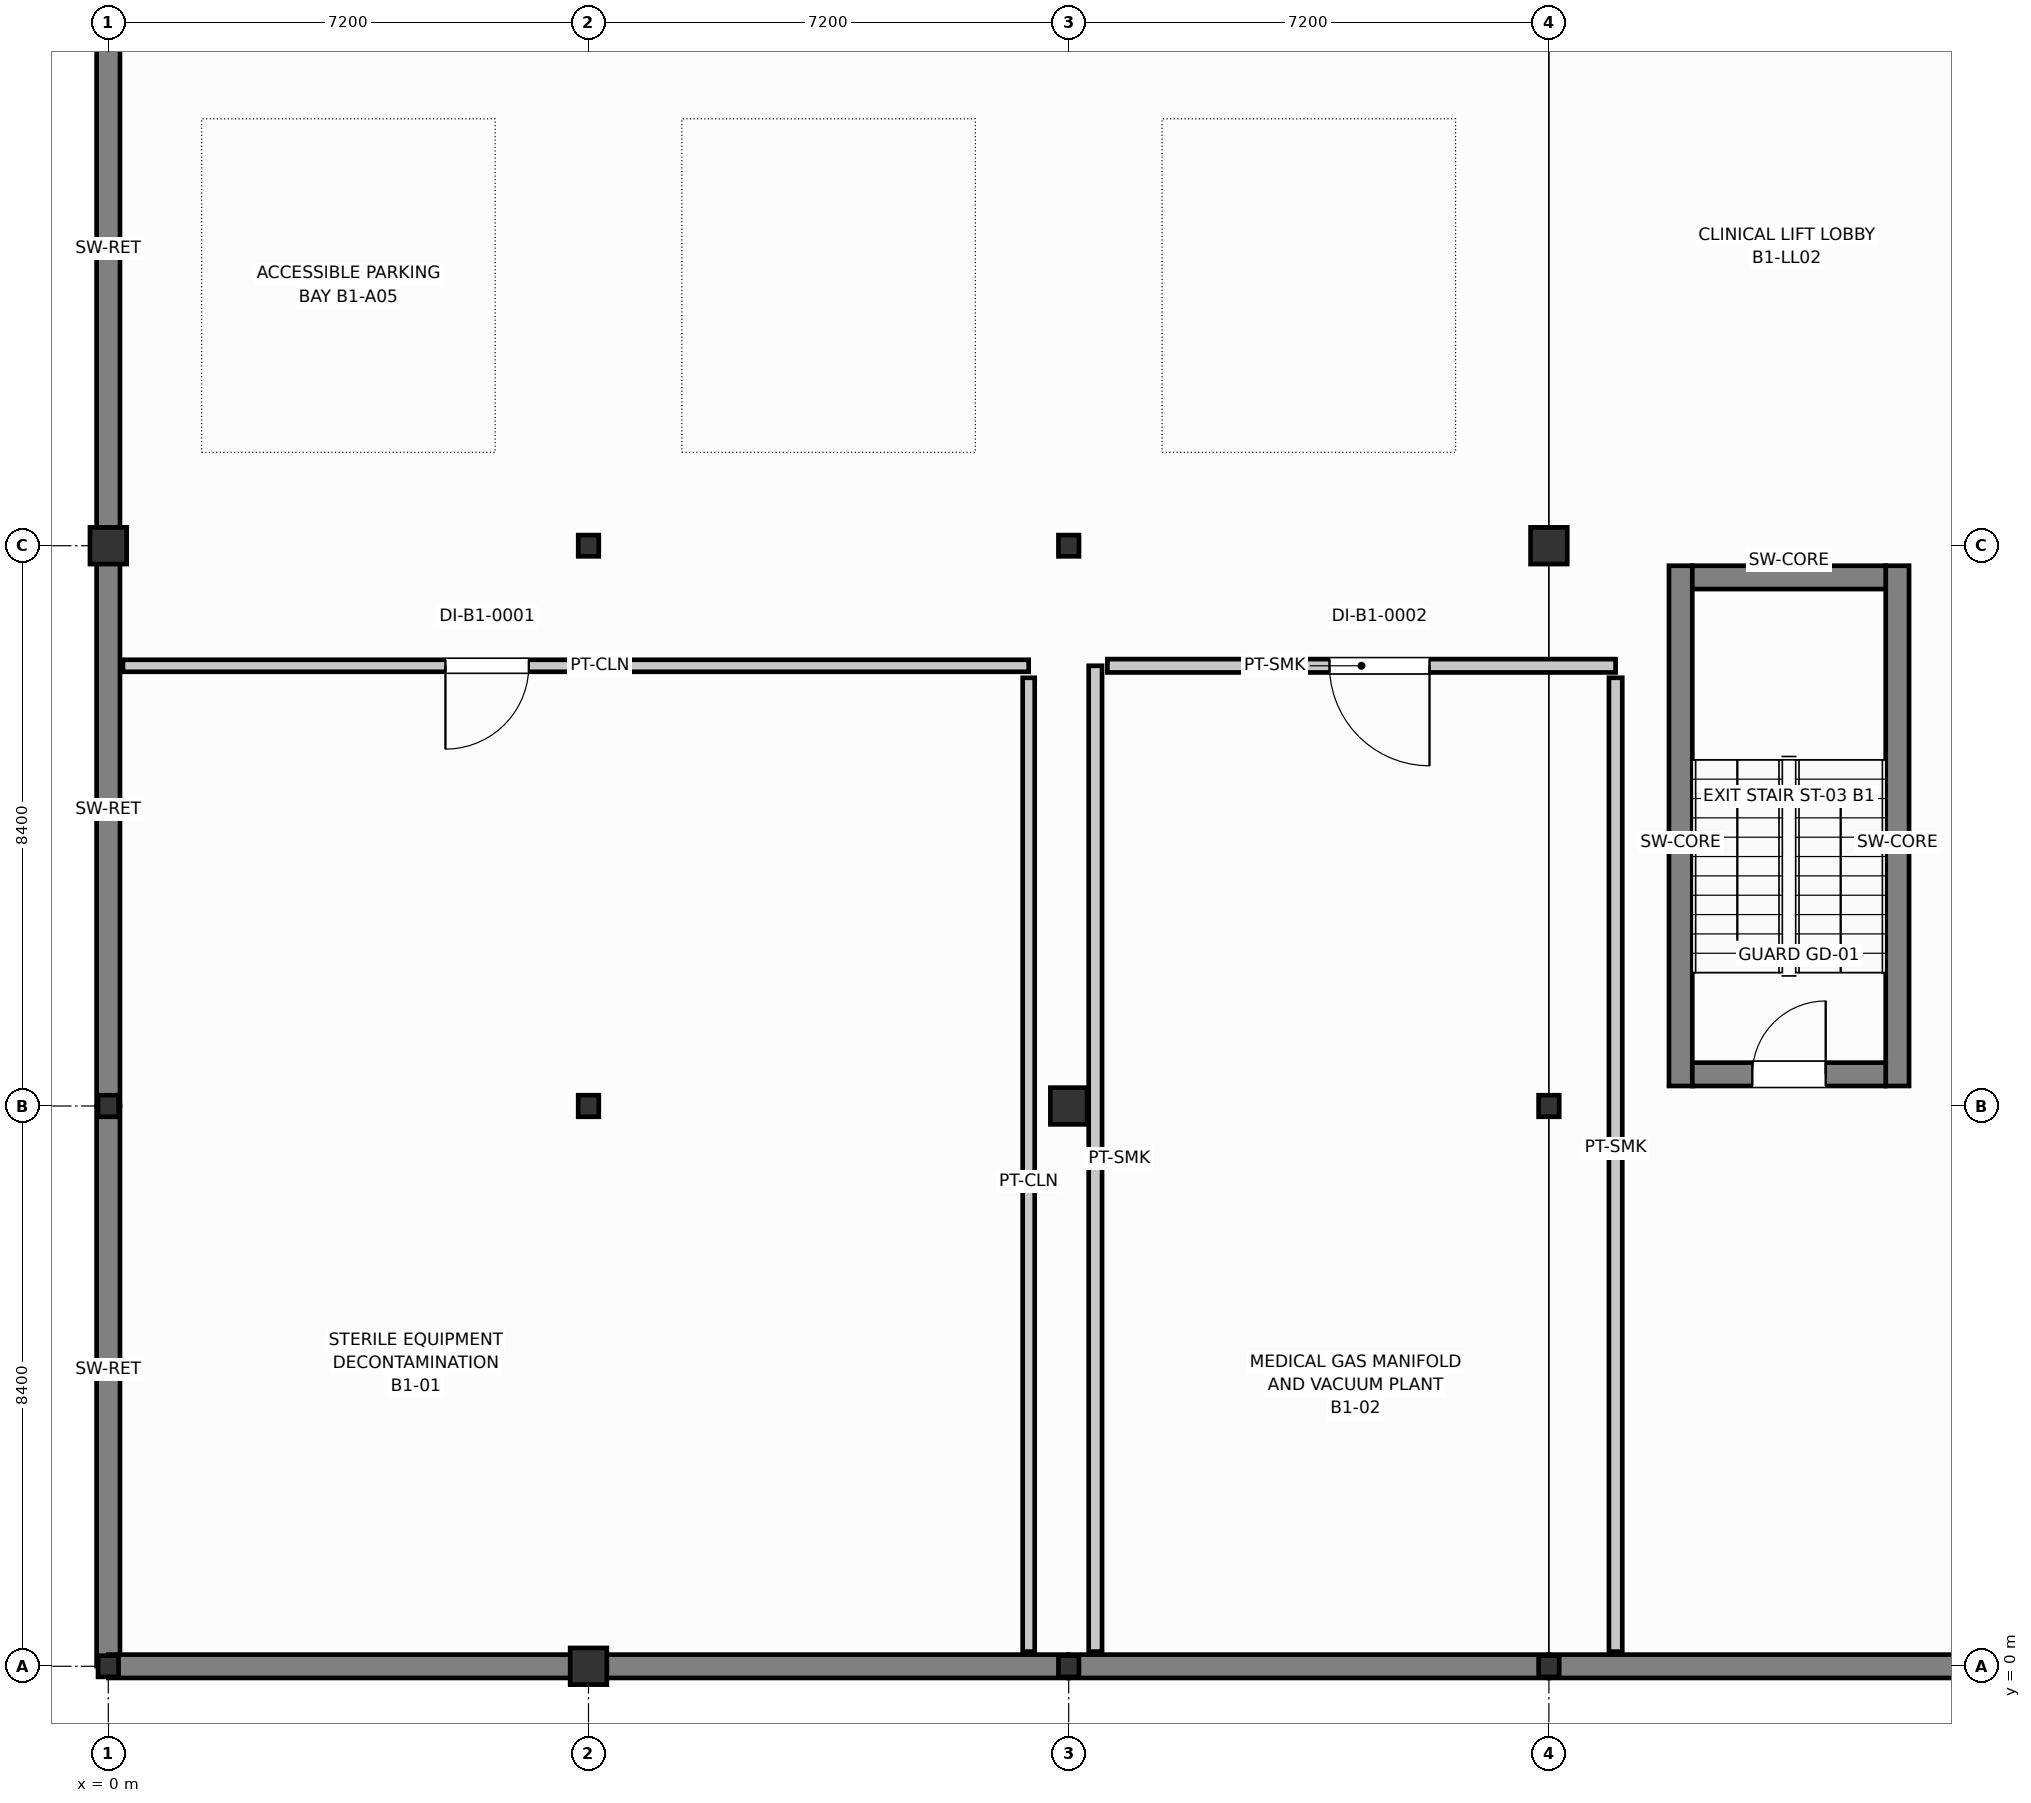
"""IFC4 building model, lengths in metres.
Left out: names, types, materials, properties, quantities, classifications, styles, units other than length and angle.
Written with IfcOpenShell. Run it as: python <this file> out.ifc"""

import sys

from ifc_helpers import new_model, si_unit, direction, frame, frame_2d, origin, origin_with_axes, origin_2d, place, context, subcontext, project, spatial, rectangle, i_section, extrude, element, fill, save


model = new_model("IFC4")
c1 = context("Model", 3, precision=1e-05, world=origin(), true_north=direction((0.0, 1.0)))
c2 = subcontext(c1, "Body", "Model", "MODEL_VIEW")
j1 = project(units=[si_unit("LENGTHUNIT", "METRE"), si_unit("PLANEANGLEUNIT", "RADIAN")], contexts=[c1])
p1 = place(None, origin())
s1 = spatial("IfcSite", under=j1, at=p1, CompositionType="ELEMENT")
p2 = place(p1, origin())
s2 = spatial("IfcBuilding", under=s1, at=p2, CompositionType="ELEMENT")
p3 = place(p2, frame((0.0, 0.0, -4.2)))
s3 = spatial("IfcBuildingStorey", under=s2, at=p3, CompositionType="ELEMENT", Elevation=-4.2)
p4 = place(p3, frame((0.0, 0.0, 0.0), z_axis=(0.0, 0.0, 1.0), x_axis=(0.0, 1.0, 0.0)))
e1 = element("IfcWall", 1, at=p4, inside=s3, PredefinedType="USERDEFINED", context=c2, shape_type="SweptSolid", body=[
    extrude(rectangle(XDim=8.4, YDim=0.35, at=frame_2d((4.2, 0.0))), origin(), (0.0, 0.0, 1.0), 3.96),
])
p5 = place(p3, frame((0.0, 8.4, 0.0), z_axis=(0.0, 0.0, 1.0), x_axis=(0.0, 1.0, 0.0)))
e2 = element("IfcWall", 2, at=p5, inside=s3, PredefinedType="USERDEFINED", context=c2, shape_type="SweptSolid", body=[
    extrude(rectangle(XDim=8.4, YDim=0.35, at=frame_2d((4.2, 0.0))), origin(), (0.0, 0.0, 1.0), 3.96),
])
p6 = place(p3, frame((0.0, 16.8, 0.0), z_axis=(0.0, 0.0, 1.0), x_axis=(0.0, 1.0, 0.0)))
e3 = element("IfcWall", 3, at=p6, inside=s3, PredefinedType="USERDEFINED", context=c2, shape_type="SweptSolid", body=[
    extrude(rectangle(XDim=8.4, YDim=0.35, at=frame_2d((4.2, 0.0))), origin(), (0.0, 0.0, 1.0), 3.96),
])
for number, where, z_axis, x_axis in (
    (4, (0.0, 0.0, 0.0), (0.0, 0.0, 1.0), (1.0, 0.0, 0.0)),
    (5, (7.2, 0.0, 0.0), (0.0, 0.0, 1.0), (1.0, 0.0, 0.0)),
):
    element("IfcWall", number, at=place(p3, frame(where, z_axis=z_axis, x_axis=x_axis)), inside=s3, PredefinedType="USERDEFINED", context=c2, shape_type="SweptSolid", body=[
        extrude(rectangle(XDim=7.2, YDim=0.35, at=frame_2d((3.6, 0.0))), origin(), (0.0, 0.0, 1.0), 3.96),
    ])
p7 = place(p3, frame((14.4, 0.0, 0.0), z_axis=(0.0, 0.0, 1.0), x_axis=(1.0, 0.0, 0.0)))
e6 = element("IfcWall", 6, at=p7, inside=s3, PredefinedType="USERDEFINED", context=c2, shape_type="SweptSolid", body=[
    extrude(rectangle(XDim=7.2, YDim=0.35, at=frame_2d((3.6, 0.0))), origin(), (0.0, 0.0, 1.0), 3.96),
])
p8 = place(p3, frame((21.6, 0.0, 0.0), z_axis=(0.0, 0.0, 1.0), x_axis=(1.0, 0.0, 0.0)))
e7 = element("IfcWall", 7, at=p8, inside=s3, PredefinedType="USERDEFINED", context=c2, shape_type="SweptSolid", body=[
    extrude(rectangle(XDim=7.2, YDim=0.35, at=frame_2d((3.6, 0.0))), origin(), (0.0, 0.0, 1.0), 3.96),
])
p9 = place(p3, origin_with_axes())
e8 = element("IfcColumn", 8, at=p9, inside=s3, PredefinedType="COLUMN", context=c2, shape_type="SweptSolid", body=[
    extrude(i_section(OverallWidth=0.308, OverallDepth=0.318, WebThickness=0.013, FlangeThickness=0.021, FilletRadius=0.016, at=origin_2d()), origin(), (0.0, 0.0, 1.0), 4.2),
])
p10 = place(p3, frame((0.0, 8.4, 0.0), z_axis=(0.0, 0.0, 1.0), x_axis=(1.0, 0.0, 0.0)))
e9 = element("IfcColumn", 9, at=p10, inside=s3, PredefinedType="COLUMN", context=c2, shape_type="SweptSolid", body=[
    extrude(i_section(OverallWidth=0.309, OverallDepth=0.323, WebThickness=0.014, FlangeThickness=0.023, FilletRadius=0.016, at=origin_2d()), origin(), (0.0, 0.0, 1.0), 4.2),
])
for number, where, z_axis, x_axis in (
    (10, (0.0, 16.8, 0.0), (0.0, 0.0, 1.0), (1.0, 0.0, 0.0)),
    (11, (7.2, 0.0, 0.0), (0.0, 0.0, 1.0), (1.0, 0.0, 0.0)),
):
    element("IfcColumn", number, at=place(p3, frame(where, z_axis=z_axis, x_axis=x_axis)), inside=s3, PredefinedType="COLUMN", context=c2, shape_type="SweptSolid", body=[
        extrude(rectangle(XDim=0.55, YDim=0.55, at=origin_2d()), origin(), (0.0, 0.0, 1.0), 4.2),
    ])
p11 = place(p3, frame((7.2, 8.4, 0.0), z_axis=(0.0, 0.0, 1.0), x_axis=(1.0, 0.0, 0.0)))
e12 = element("IfcColumn", 12, at=p11, inside=s3, PredefinedType="COLUMN", context=c2, shape_type="SweptSolid", body=[
    extrude(i_section(OverallWidth=0.309, OverallDepth=0.323, WebThickness=0.014, FlangeThickness=0.023, FilletRadius=0.016, at=origin_2d()), origin(), (0.0, 0.0, 1.0), 4.2),
])
for number, where, z_axis, x_axis in (
    (13, (7.2, 16.8, 0.0), (0.0, 0.0, 1.0), (1.0, 0.0, 0.0)),
    (14, (14.4, 0.0, 0.0), (0.0, 0.0, 1.0), (1.0, 0.0, 0.0)),
):
    element("IfcColumn", number, at=place(p3, frame(where, z_axis=z_axis, x_axis=x_axis)), inside=s3, PredefinedType="COLUMN", context=c2, shape_type="SweptSolid", body=[
        extrude(i_section(OverallWidth=0.308, OverallDepth=0.318, WebThickness=0.013, FlangeThickness=0.021, FilletRadius=0.016, at=origin_2d()), origin(), (0.0, 0.0, 1.0), 4.2),
    ])
p12 = place(p3, frame((14.4, 8.4, 0.0), z_axis=(0.0, 0.0, 1.0), x_axis=(1.0, 0.0, 0.0)))
e15 = element("IfcColumn", 15, at=p12, inside=s3, PredefinedType="COLUMN", context=c2, shape_type="SweptSolid", body=[
    extrude(rectangle(XDim=0.55, YDim=0.55, at=origin_2d()), origin(), (0.0, 0.0, 1.0), 4.2),
])
for number, where, z_axis, x_axis in (
    (16, (14.4, 16.8, 0.0), (0.0, 0.0, 1.0), (1.0, 0.0, 0.0)),
    (17, (21.6, 0.0, 0.0), (0.0, 0.0, 1.0), (1.0, 0.0, 0.0)),
):
    element("IfcColumn", number, at=place(p3, frame(where, z_axis=z_axis, x_axis=x_axis)), inside=s3, PredefinedType="COLUMN", context=c2, shape_type="SweptSolid", body=[
        extrude(i_section(OverallWidth=0.308, OverallDepth=0.318, WebThickness=0.013, FlangeThickness=0.021, FilletRadius=0.016, at=origin_2d()), origin(), (0.0, 0.0, 1.0), 4.2),
    ])
p13 = place(p3, frame((21.6, 8.4, 0.0), z_axis=(0.0, 0.0, 1.0), x_axis=(1.0, 0.0, 0.0)))
e18 = element("IfcColumn", 18, at=p13, inside=s3, PredefinedType="COLUMN", context=c2, shape_type="SweptSolid", body=[
    extrude(i_section(OverallWidth=0.309, OverallDepth=0.323, WebThickness=0.014, FlangeThickness=0.023, FilletRadius=0.016, at=origin_2d()), origin(), (0.0, 0.0, 1.0), 4.2),
])
p14 = place(p3, frame((21.6, 16.8, 0.0), z_axis=(0.0, 0.0, 1.0), x_axis=(1.0, 0.0, 0.0)))
e19 = element("IfcColumn", 19, at=p14, inside=s3, PredefinedType="COLUMN", context=c2, shape_type="SweptSolid", body=[
    extrude(rectangle(XDim=0.55, YDim=0.55, at=origin_2d()), origin(), (0.0, 0.0, 1.0), 4.2),
])
for number, where, z_axis, x_axis in (
    (20, (23.575, 8.7, 0.0), (0.0, 0.0, 1.0), (0.0, 1.0, 0.0)),
    (21, (26.825, 8.7, 0.0), (0.0, 0.0, 1.0), (0.0, 1.0, 0.0)),
):
    element("IfcWall", number, at=place(p3, frame(where, z_axis=z_axis, x_axis=x_axis)), inside=s3, PredefinedType="SHEAR", context=c2, shape_type="SweptSolid", body=[
        extrude(rectangle(XDim=7.8, YDim=0.35, at=frame_2d((3.9, 0.0))), origin(), (0.0, 0.0, 1.0), 3.96),
    ])
p15 = place(p3, frame((23.75, 16.325, 0.0), z_axis=(0.0, 0.0, 1.0), x_axis=(1.0, 0.0, 0.0)))
e22 = element("IfcWall", 22, at=p15, inside=s3, PredefinedType="SHEAR", context=c2, shape_type="SweptSolid", body=[
    extrude(rectangle(XDim=2.9, YDim=0.35, at=frame_2d((1.45, 0.0))), origin(), (0.0, 0.0, 1.0), 3.96),
])
p16 = place(p3, frame((23.75, 8.875, 0.0), z_axis=(0.0, 0.0, 1.0), x_axis=(1.0, 0.0, 0.0)))
e23 = element("IfcWall", 23, at=p16, inside=s3, PredefinedType="SHEAR", context=c2, shape_type="SweptSolid", body=[
    extrude(rectangle(XDim=2.9, YDim=0.35, at=frame_2d((1.45, 0.0))), origin(), (0.0, 0.0, 1.0), 3.96),
])
p17 = place(p16, frame((0.9, 0.0, 0.0)))
e24 = element("IfcOpeningElement", 24, at=p17, cuts=e23, PredefinedType="OPENING", context=c2, shape_type="SweptSolid", body=[
    extrude(rectangle(XDim=1.1, YDim=2.15, at=frame_2d((0.55, 1.075))), frame((0.0, 0.185, 0.0), z_axis=(0.0, -1.0, 0.0), x_axis=(1.0, 0.0, 0.0)), (0.0, 0.0, 1.0), 0.37),
])
p18 = place(p3, frame((0.22, 15.0, 0.0), z_axis=(0.0, 0.0, 1.0), x_axis=(1.0, 0.0, 0.0)))
e25 = element("IfcWall", 25, at=p18, inside=s3, PredefinedType="PARTITIONING", context=c2, shape_type="SweptSolid", body=[
    extrude(rectangle(XDim=13.58, YDim=0.18, at=frame_2d((6.79, 0.0))), origin(), (0.0, 0.0, 1.0), 3.535),
])
p19 = place(p18, frame((4.835, 0.0, 0.0)))
e26 = element("IfcOpeningElement", 26, at=p19, cuts=e25, PredefinedType="OPENING", context=c2, shape_type="SweptSolid", body=[
    extrude(rectangle(XDim=1.25, YDim=2.2, at=frame_2d((0.625, 1.1))), frame((0.0, 0.1, 0.0), z_axis=(0.0, -1.0, 0.0), x_axis=(1.0, 0.0, 0.0)), (0.0, 0.0, 1.0), 0.2),
])
p20 = place(p3, frame((13.8, 14.82, 0.0), z_axis=(0.0, 0.0, 1.0), x_axis=(0.0, -1.0, 0.0)))
e27 = element("IfcWall", 27, at=p20, inside=s3, PredefinedType="PARTITIONING", context=c2, shape_type="SweptSolid", body=[
    extrude(rectangle(XDim=14.6, YDim=0.18, at=frame_2d((7.3, 0.0))), origin(), (0.0, 0.0, 1.0), 3.257),
])
p21 = place(p3, frame((14.8, 0.22, 0.0), z_axis=(0.0, 0.0, 1.0), x_axis=(0.0, 1.0, 0.0)))
e28 = element("IfcWall", 28, at=p21, inside=s3, PredefinedType="PARTITIONING", context=c2, shape_type="SweptSolid", body=[
    extrude(rectangle(XDim=14.78, YDim=0.2, at=frame_2d((7.39, 0.0))), origin(), (0.0, 0.0, 1.0), 3.328),
])
p22 = place(p3, frame((14.98, 15.0, 0.0), z_axis=(0.0, 0.0, 1.0), x_axis=(1.0, 0.0, 0.0)))
e29 = element("IfcWall", 29, at=p22, inside=s3, PredefinedType="PARTITIONING", context=c2, shape_type="SweptSolid", body=[
    extrude(rectangle(XDim=7.62, YDim=0.2, at=frame_2d((3.81, 0.0))), origin(), (0.0, 0.0, 1.0), 3.328),
])
p23 = place(p22, frame((3.33, 0.0, 0.0)))
e30 = element("IfcOpeningElement", 30, at=p23, cuts=e29, PredefinedType="OPENING", context=c2, shape_type="SweptSolid", body=[
    extrude(rectangle(XDim=1.5, YDim=2.25, at=frame_2d((0.75, 1.125))), frame((0.0, 0.11, 0.0), z_axis=(0.0, -1.0, 0.0), x_axis=(1.0, 0.0, 0.0)), (0.0, 0.0, 1.0), 0.22),
])
p24 = place(p3, frame((22.6, 14.82, 0.0), z_axis=(0.0, 0.0, 1.0), x_axis=(0.0, -1.0, 0.0)))
e31 = element("IfcWall", 31, at=p24, inside=s3, PredefinedType="PARTITIONING", context=c2, shape_type="SweptSolid", body=[
    extrude(rectangle(XDim=14.6, YDim=0.2, at=frame_2d((7.3, 0.0))), origin(), (0.0, 0.0, 1.0), 3.333),
])
p25 = place(p17, origin())
e32 = element("IfcDoor", 32, at=p25, inside=s3, OperationType="SINGLE_SWING_RIGHT", PredefinedType="DOOR", context=c2, shape_type="SweptSolid", body=[
    extrude(rectangle(XDim=1.1, YDim=2.15, at=frame_2d((0.55, 1.075))), frame((0.0, 0.025, 0.0), z_axis=(0.0, -1.0, 0.0), x_axis=(1.0, 0.0, 0.0)), (0.0, 0.0, 1.0), 0.05),
])
fill(e24, e32)
p26 = place(p19, frame((1.25, 0.0, 0.0), z_axis=(0.0, 0.0, 1.0), x_axis=(-1.0, 0.0, 0.0)))
e33 = element("IfcDoor", 33, at=p26, inside=s3, OperationType="SINGLE_SWING_RIGHT", PredefinedType="DOOR", context=c2, shape_type="SweptSolid", body=[
    extrude(rectangle(XDim=1.25, YDim=2.2, at=frame_2d((0.625, 1.1))), frame((0.0, 0.025, 0.0), z_axis=(0.0, -1.0, 0.0), x_axis=(1.0, 0.0, 0.0)), (0.0, 0.0, 1.0), 0.05),
])
fill(e26, e33)
p27 = place(p23, frame((1.5, 0.0, 0.0), z_axis=(0.0, 0.0, 1.0), x_axis=(-1.0, 0.0, 0.0)))
e34 = element("IfcDoor", 34, at=p27, inside=s3, OperationType="SINGLE_SWING_LEFT", PredefinedType="DOOR", context=c2, shape_type="SweptSolid", body=[
    extrude(rectangle(XDim=1.5, YDim=2.25, at=frame_2d((0.75, 1.125))), frame((0.0, 0.025, 0.0), z_axis=(0.0, -1.0, 0.0), x_axis=(1.0, 0.0, 0.0)), (0.0, 0.0, 1.0), 0.05),
])
fill(e30, e34)
save(model, sys.argv[1])
